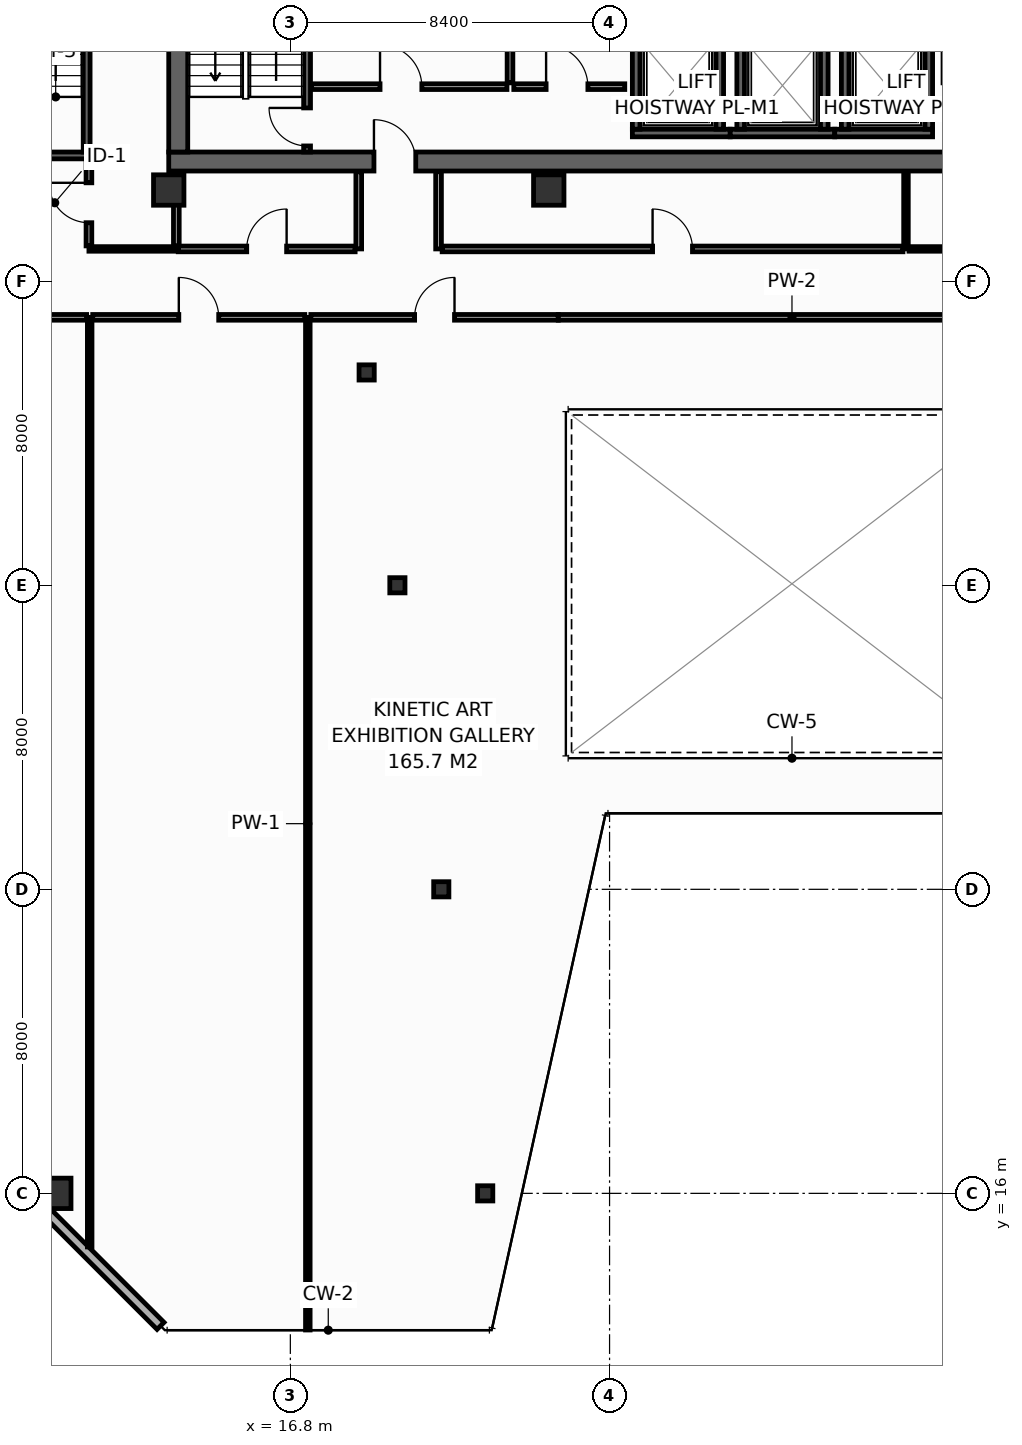
"""IFC4 building model, lengths in metres.
Left out: names, types, materials, properties, quantities, classifications, styles, units other than length and angle.
Written with IfcOpenShell. Run it as: python <this file> out.ifc"""

import sys

from ifc_helpers import new_model, si_unit, direction, frame, frame_2d, origin, origin_2d, place, context, subcontext, project, spatial, rectangle, hollow_rectangle, extrude, element, fill, save


model = new_model("IFC4")
c1 = context("Model", 3, precision=1e-05, world=origin(), true_north=direction((0.0, 1.0)))
c2 = subcontext(c1, "Body", "Model", "MODEL_VIEW")
j1 = project(units=[si_unit("LENGTHUNIT", "METRE"), si_unit("PLANEANGLEUNIT", "RADIAN")], contexts=[c1])
p1 = place(None, origin())
s1 = spatial("IfcSite", under=j1, at=p1, CompositionType="ELEMENT")
p2 = place(p1, origin())
s2 = spatial("IfcBuilding", under=s1, at=p2, CompositionType="ELEMENT")
p3 = place(p2, frame((0.0, 0.0, 209.4)))
s3 = spatial("IfcBuildingStorey", under=s2, at=p3, CompositionType="ELEMENT", Elevation=209.4)
p4 = place(p3, frame((13.6, 43.15, 0.0), z_axis=(0.0, 0.0, 1.0), x_axis=(1.0, 0.0, 0.0)))
e1 = element("IfcWall", 1, at=p4, inside=s3, PredefinedType="SHEAR", context=c2, shape_type="SweptSolid", body=[
    extrude(rectangle(XDim=32.7, YDim=0.5, at=frame_2d((16.35, 0.0))), origin(), (0.0, 0.0, 1.0), 3.55),
])
p5 = place(p4, frame((5.4, 0.0, 0.0)))
e2 = element("IfcOpeningElement", 2, at=p5, cuts=e1, PredefinedType="OPENING", context=c2, shape_type="SweptSolid", body=[
    extrude(rectangle(XDim=1.1, YDim=2.15, at=frame_2d((0.55, 1.075))), frame((0.0, 0.26, 0.0), z_axis=(0.0, -1.0, 0.0), x_axis=(1.0, 0.0, 0.0)), (0.0, 0.0, 1.0), 0.52),
])
p6 = place(p4, frame((25.6, 0.0, 0.0)))
e3 = element("IfcOpeningElement", 3, at=p6, cuts=e1, PredefinedType="OPENING", context=c2, shape_type="SweptSolid", body=[
    extrude(rectangle(XDim=1.1, YDim=2.15, at=frame_2d((0.55, 1.075))), frame((0.0, 0.26, 0.0), z_axis=(0.0, -1.0, 0.0), x_axis=(1.0, 0.0, 0.0)), (0.0, 0.0, 1.0), 0.52),
])
p7 = place(p3, frame((13.85, 43.4, 0.0), z_axis=(0.0, 0.0, 1.0), x_axis=(0.0, 1.0, 0.0)))
e4 = element("IfcWall", 4, at=p7, inside=s3, PredefinedType="SHEAR", context=c2, shape_type="SweptSolid", body=[
    extrude(rectangle(XDim=10.4, YDim=0.5, at=frame_2d((5.2, 0.0))), origin(), (0.0, 0.0, 1.0), 3.55),
])
for number, where, z_axis, x_axis in (
    (5, (13.6, 42.4, 0.0), (0.0, 0.0, 1.0), (1.0, 0.0, 0.0)),
    (6, (23.6, 42.4, 0.0), (0.0, 0.0, 1.0), (1.0, 0.0, 0.0)),
    (7, (10.628, 16.0, 0.0), (0.0, 0.0, 1.0), (1.0, 0.0, 0.0)),
):
    element("IfcColumn", number, at=place(p3, frame(where, z_axis=z_axis, x_axis=x_axis)), inside=s3, PredefinedType="COLUMN", context=c2, shape_type="SweptSolid", body=[
        extrude(hollow_rectangle(XDim=0.8, YDim=0.8, WallThickness=0.036, at=origin_2d()), origin(), (0.0, 0.0, 1.0), 3.8),
    ])
for number, where, z_axis, x_axis in (
    (8, (21.928, 16.0, 0.0), (0.0, 0.0, 1.0), (1.0, 0.0, 0.0)),
    (9, (20.772, 24.0, 0.0), (0.0, 0.0, 1.0), (1.0, 0.0, 0.0)),
    (10, (19.617, 32.0, 0.0), (0.0, 0.0, 1.0), (1.0, 0.0, 0.0)),
    (11, (18.808, 37.6, 0.0), (0.0, 0.0, 1.0), (1.0, 0.0, 0.0)),
):
    element("IfcColumn", number, at=place(p3, frame(where, z_axis=z_axis, x_axis=x_axis)), inside=s3, PredefinedType="COLUMN", context=c2, shape_type="SweptSolid", body=[
        extrude(hollow_rectangle(XDim=0.4, YDim=0.4, WallThickness=0.016, at=origin_2d()), origin(), (0.0, 0.0, 1.0), 3.8),
    ])
p8 = place(p3, frame((25.8, 43.9, 0.0), z_axis=(0.0, 0.0, 1.0), x_axis=(1.0, 0.0, 0.0)))
e12 = element("IfcWall", 12, at=p8, inside=s3, PredefinedType="SHEAR", context=c2, shape_type="SweptSolid", body=[
    extrude(rectangle(XDim=2.575, YDim=0.2, at=frame_2d((1.288, 0.0))), origin(), (0.0, 0.0, 1.0), 3.55),
])
for number, where, z_axis, x_axis in (
    (13, (25.9, 44.0, 0.0), (0.0, 0.0, 1.0), (0.0, 1.0, 0.0)),
    (14, (28.1, 44.0, 0.0), (0.0, 0.0, 1.0), (0.0, 1.0, 0.0)),
):
    element("IfcWall", number, at=place(p3, frame(where, z_axis=z_axis, x_axis=x_axis)), inside=s3, PredefinedType="SHEAR", context=c2, shape_type="SweptSolid", body=[
        extrude(rectangle(XDim=2.3, YDim=0.2, at=frame_2d((1.15, 0.0))), origin(), (0.0, 0.0, 1.0), 3.55),
    ])
p9 = place(p3, frame((28.375, 43.9, 0.0), z_axis=(0.0, 0.0, 1.0), x_axis=(1.0, 0.0, 0.0)))
e15 = element("IfcWall", 15, at=p9, inside=s3, PredefinedType="SHEAR", context=c2, shape_type="SweptSolid", body=[
    extrude(rectangle(XDim=2.75, YDim=0.2, at=frame_2d((1.375, 0.0))), origin(), (0.0, 0.0, 1.0), 3.55),
])
for number, where, z_axis, x_axis in (
    (16, (28.65, 44.0, 0.0), (0.0, 0.0, 1.0), (0.0, 1.0, 0.0)),
    (17, (30.85, 44.0, 0.0), (0.0, 0.0, 1.0), (0.0, 1.0, 0.0)),
):
    element("IfcWall", number, at=place(p3, frame(where, z_axis=z_axis, x_axis=x_axis)), inside=s3, PredefinedType="SHEAR", context=c2, shape_type="SweptSolid", body=[
        extrude(rectangle(XDim=2.3, YDim=0.2, at=frame_2d((1.15, 0.0))), origin(), (0.0, 0.0, 1.0), 3.55),
    ])
p10 = place(p3, frame((31.125, 43.9, 0.0), z_axis=(0.0, 0.0, 1.0), x_axis=(1.0, 0.0, 0.0)))
e18 = element("IfcWall", 18, at=p10, inside=s3, PredefinedType="SHEAR", context=c2, shape_type="SweptSolid", body=[
    extrude(rectangle(XDim=2.575, YDim=0.2, at=frame_2d((1.288, 0.0))), origin(), (0.0, 0.0, 1.0), 3.55),
])
for number, where, z_axis, x_axis in (
    (19, (31.4, 44.0, 0.0), (0.0, 0.0, 1.0), (0.0, 1.0, 0.0)),
    (20, (33.6, 44.0, 0.0), (0.0, 0.0, 1.0), (0.0, 1.0, 0.0)),
):
    element("IfcWall", number, at=place(p3, frame(where, z_axis=z_axis, x_axis=x_axis)), inside=s3, PredefinedType="SHEAR", context=c2, shape_type="SweptSolid", body=[
        extrude(rectangle(XDim=2.3, YDim=0.2, at=frame_2d((1.15, 0.0))), origin(), (0.0, 0.0, 1.0), 3.55),
    ])
p11 = place(p3, frame((17.24, 43.4, 0.0), z_axis=(0.0, 0.0, 1.0), x_axis=(0.0, 1.0, 0.0)))
e21 = element("IfcWall", 21, at=p11, inside=s3, PredefinedType="SHEAR", context=c2, shape_type="SweptSolid", body=[
    extrude(rectangle(XDim=10.4, YDim=0.18, at=frame_2d((5.2, 0.0))), origin(), (0.0, 0.0, 1.0), 3.55),
])
p12 = place(p11, frame((0.16, 0.0, 0.0)))
e22 = element("IfcOpeningElement", 22, at=p12, cuts=e21, PredefinedType="OPENING", context=c2, shape_type="SweptSolid", body=[
    extrude(rectangle(XDim=1.0, YDim=2.15, at=frame_2d((0.5, 1.075))), frame((0.0, 0.1, 0.0), z_axis=(0.0, -1.0, 0.0), x_axis=(1.0, 0.0, 0.0)), (0.0, 0.0, 1.0), 0.2),
])
p13 = place(p3, frame((8.12, 43.31, 0.0), z_axis=(0.0, 0.0, 1.0), x_axis=(1.0, 0.0, 0.0)))
e23 = element("IfcWall", 23, at=p13, inside=s3, PredefinedType="SHEAR", context=c2, shape_type="SweptSolid", body=[
    extrude(rectangle(XDim=3.41, YDim=0.18, at=frame_2d((1.705, 0.0))), origin(), (0.0, 0.0, 1.0), 3.55),
])
p14 = place(p13, frame((1.15, 0.0, 0.0)))
e24 = element("IfcOpeningElement", 24, at=p14, cuts=e23, PredefinedType="OPENING", context=c2, shape_type="SweptSolid", body=[
    extrude(rectangle(XDim=1.1, YDim=2.15, at=frame_2d((0.55, 1.075))), frame((0.0, 0.1, 0.0), z_axis=(0.0, -1.0, 0.0), x_axis=(1.0, 0.0, 0.0)), (0.0, 0.0, 1.0), 0.2),
])
p15 = place(p3, frame((11.44, 43.4, 0.0), z_axis=(0.0, 0.0, 1.0), x_axis=(0.0, 1.0, 0.0)))
e25 = element("IfcWall", 25, at=p15, inside=s3, PredefinedType="SHEAR", context=c2, shape_type="SweptSolid", body=[
    extrude(rectangle(XDim=10.4, YDim=0.18, at=frame_2d((5.2, 0.0))), origin(), (0.0, 0.0, 1.0), 3.55),
])
p16 = place(p3, frame((17.36, 45.12, 0.0), z_axis=(0.0, 0.0, 1.0), x_axis=(1.0, 0.0, 0.0)))
e26 = element("IfcWall", 26, at=p16, inside=s3, PredefinedType="PARTITIONING", context=c2, shape_type="SweptSolid", body=[
    extrude(rectangle(XDim=5.14, YDim=0.15, at=frame_2d((2.57, 0.0))), origin(), (0.0, 0.0, 1.0), 3.55),
])
p17 = place(p16, frame((1.8, 0.0, 0.0)))
e27 = element("IfcOpeningElement", 27, at=p17, cuts=e26, PredefinedType="OPENING", context=c2, shape_type="SweptSolid", body=[
    extrude(rectangle(XDim=1.1, YDim=2.15, at=frame_2d((0.55, 1.075))), frame((0.0, 0.085, 0.0), z_axis=(0.0, -1.0, 0.0), x_axis=(1.0, 0.0, 0.0)), (0.0, 0.0, 1.0), 0.17),
])
p18 = place(p3, frame((22.58, 50.55, 0.0), z_axis=(0.0, 0.0, 1.0), x_axis=(0.0, -1.0, 0.0)))
e28 = element("IfcWall", 28, at=p18, inside=s3, PredefinedType="PARTITIONING", context=c2, shape_type="SweptSolid", body=[
    extrude(rectangle(XDim=5.33, YDim=0.15, at=frame_2d((2.665, 0.0))), origin(), (0.0, 0.0, 1.0), 3.55),
])
p19 = place(p18, frame((1.8, 0.0, 0.0)))
e29 = element("IfcOpeningElement", 29, at=p19, cuts=e28, PredefinedType="OPENING", context=c2, shape_type="SweptSolid", body=[
    extrude(rectangle(XDim=1.1, YDim=2.15, at=frame_2d((0.55, 1.075))), frame((0.0, 0.085, 0.0), z_axis=(0.0, -1.0, 0.0), x_axis=(1.0, 0.0, 0.0)), (0.0, 0.0, 1.0), 0.17),
])
p20 = place(p3, frame((22.68, 45.12, 0.0), z_axis=(0.0, 0.0, 1.0), x_axis=(1.0, 0.0, 0.0)))
e30 = element("IfcWall", 30, at=p20, inside=s3, PredefinedType="PARTITIONING", context=c2, shape_type="SweptSolid", body=[
    extrude(rectangle(XDim=2.92, YDim=0.15, at=frame_2d((1.46, 0.0))), origin(), (0.0, 0.0, 1.0), 3.55),
])
p21 = place(p20, frame((0.85, 0.0, 0.0)))
e31 = element("IfcOpeningElement", 31, at=p21, cuts=e30, PredefinedType="OPENING", context=c2, shape_type="SweptSolid", body=[
    extrude(rectangle(XDim=1.1, YDim=2.15, at=frame_2d((0.55, 1.075))), frame((0.0, 0.085, 0.0), z_axis=(0.0, -1.0, 0.0), x_axis=(1.0, 0.0, 0.0)), (0.0, 0.0, 1.0), 0.17),
])
p22 = place(p3, frame((10.411, 15.487, 0.0), z_axis=(0.0, 0.0, 1.0), x_axis=(0.707135806771, -0.70707775441, 0.0)))
e32 = element("IfcWall", 32, at=p22, inside=s3, PredefinedType="STANDARD", context=c2, shape_type="SweptSolid", body=[
    extrude(rectangle(XDim=4.206, YDim=0.26, at=frame_2d((2.103, 0.0))), origin(), (0.0, 0.0, 1.0), 3.55),
])
p23 = place(p3, frame((11.5, 40.85, 0.0), z_axis=(0.0, 0.0, 1.0), x_axis=(1.0, 0.0, 0.0)))
e33 = element("IfcWall", 33, at=p23, inside=s3, PredefinedType="PARTITIONING", context=c2, shape_type="SweptSolid", body=[
    extrude(rectangle(XDim=2.35, YDim=0.12, at=frame_2d((1.175, 0.0))), origin(), (0.0, 0.0, 1.0), 3.55),
])
p24 = place(p3, frame((11.5, 40.93, 0.0), z_axis=(0.0, 0.0, 1.0), x_axis=(0.0, 1.0, 0.0)))
e34 = element("IfcWall", 34, at=p24, inside=s3, PredefinedType="PARTITIONING", context=c2, shape_type="SweptSolid", body=[
    extrude(rectangle(XDim=2.27, YDim=0.15, at=frame_2d((1.135, 0.0))), origin(), (0.0, 0.0, 1.0), 2.835),
])
p25 = place(p24, frame((0.61, 0.0, 0.0)))
e35 = element("IfcOpeningElement", 35, at=p25, cuts=e34, PredefinedType="OPENING", context=c2, shape_type="SweptSolid", body=[
    extrude(rectangle(XDim=1.05, YDim=2.15, at=frame_2d((0.525, 1.075))), frame((0.0, 0.085, 0.0), z_axis=(0.0, -1.0, 0.0), x_axis=(1.0, 0.0, 0.0)), (0.0, 0.0, 1.0), 0.17),
])
p26 = place(p3, frame((13.8, 40.93, 0.0), z_axis=(0.0, 0.0, 1.0), x_axis=(0.0, 1.0, 0.0)))
e36 = element("IfcWall", 36, at=p26, inside=s3, PredefinedType="PARTITIONING", context=c2, shape_type="SweptSolid", body=[
    extrude(rectangle(XDim=1.95, YDim=0.15, at=frame_2d((0.975, 0.0))), origin(), (0.0, 0.0, 1.0), 3.55),
])
for number, where, z_axis, x_axis in (
    (37, (18.6, 40.85, 0.0), (0.0, 0.0, 1.0), (0.0, 1.0, 0.0)),
    (38, (20.7, 40.85, 0.0), (0.0, 0.0, 1.0), (0.0, 1.0, 0.0)),
):
    element("IfcWall", number, at=place(p3, frame(where, z_axis=z_axis, x_axis=x_axis)), inside=s3, PredefinedType="PARTITIONING", context=c2, shape_type="SweptSolid", body=[
        extrude(rectangle(XDim=2.03, YDim=0.15, at=frame_2d((1.015, 0.0))), origin(), (0.0, 0.0, 1.0), 3.55),
    ])
p27 = place(p3, frame((13.85, 40.85, 0.0), z_axis=(0.0, 0.0, 1.0), x_axis=(1.0, 0.0, 0.0)))
e39 = element("IfcWall", 39, at=p27, inside=s3, PredefinedType="PARTITIONING", context=c2, shape_type="SweptSolid", body=[
    extrude(rectangle(XDim=4.655, YDim=0.15, at=frame_2d((2.327, 0.0))), origin(), (0.0, 0.0, 1.0), 3.55),
])
p28 = place(p27, frame((1.802, 0.0, 0.0)))
e40 = element("IfcOpeningElement", 40, at=p28, cuts=e39, PredefinedType="OPENING", context=c2, shape_type="SweptSolid", body=[
    extrude(rectangle(XDim=1.05, YDim=2.15, at=frame_2d((0.525, 1.075))), frame((0.0, 0.085, 0.0), z_axis=(0.0, -1.0, 0.0), x_axis=(1.0, 0.0, 0.0)), (0.0, 0.0, 1.0), 0.17),
])
p29 = place(p3, frame((33.0, 40.85, 0.0), z_axis=(0.0, 0.0, 1.0), x_axis=(0.0, 1.0, 0.0)))
e41 = element("IfcWall", 41, at=p29, inside=s3, PredefinedType="PARTITIONING", context=c2, shape_type="SweptSolid", body=[
    extrude(rectangle(XDim=2.03, YDim=0.12, at=frame_2d((1.015, 0.0))), origin(), (0.0, 0.0, 1.0), 2.835),
])
p30 = place(p3, frame((20.795, 40.85, 0.0), z_axis=(0.0, 0.0, 1.0), x_axis=(1.0, 0.0, 0.0)))
e42 = element("IfcWall", 42, at=p30, inside=s3, PredefinedType="PARTITIONING", context=c2, shape_type="SweptSolid", body=[
    extrude(rectangle(XDim=12.125, YDim=0.15, at=frame_2d((6.062, 0.0))), origin(), (0.0, 0.0, 1.0), 2.835),
])
p31 = place(p30, frame((5.537, 0.0, 0.0)))
e43 = element("IfcOpeningElement", 43, at=p31, cuts=e42, PredefinedType="OPENING", context=c2, shape_type="SweptSolid", body=[
    extrude(rectangle(XDim=1.05, YDim=2.15, at=frame_2d((0.525, 1.075))), frame((0.0, 0.085, 0.0), z_axis=(0.0, -1.0, 0.0), x_axis=(1.0, 0.0, 0.0)), (0.0, 0.0, 1.0), 0.17),
])
p32 = place(p3, frame((33.08, 40.85, 0.0), z_axis=(0.0, 0.0, 1.0), x_axis=(1.0, 0.0, 0.0)))
e44 = element("IfcWall", 44, at=p32, inside=s3, PredefinedType="PARTITIONING", context=c2, shape_type="SweptSolid", body=[
    extrude(rectangle(XDim=5.625, YDim=0.12, at=frame_2d((2.812, 0.0))), origin(), (0.0, 0.0, 1.0), 2.835),
])
p33 = place(p32, frame((1.702, 0.0, 0.0)))
e45 = element("IfcOpeningElement", 45, at=p33, cuts=e44, PredefinedType="OPENING", context=c2, shape_type="SweptSolid", body=[
    extrude(rectangle(XDim=0.9, YDim=2.1, at=frame_2d((0.45, 1.05))), frame((0.0, 0.07, 0.0), z_axis=(0.0, -1.0, 0.0), x_axis=(1.0, 0.0, 0.0)), (0.0, 0.0, 1.0), 0.14),
])
p34 = place(p3, frame((11.52, 14.59, 0.0), z_axis=(0.0, 0.0, 1.0), x_axis=(0.0, 1.0, 0.0)))
e46 = element("IfcWall", 46, at=p34, inside=s3, PredefinedType="PARTITIONING", context=c2, shape_type="SweptSolid", body=[
    extrude(rectangle(XDim=24.46, YDim=0.12, at=frame_2d((12.23, 0.0))), origin(), (0.0, 0.0, 1.0), 2.835),
])
p35 = place(p3, frame((17.26, 12.405, 0.0), z_axis=(0.0, 0.0, 1.0), x_axis=(0.0, 1.0, 0.0)))
e47 = element("IfcWall", 47, at=p35, inside=s3, PredefinedType="PARTITIONING", context=c2, shape_type="SweptSolid", body=[
    extrude(rectangle(XDim=26.645, YDim=0.12, at=frame_2d((13.323, 0.0))), origin(), (0.0, 0.0, 1.0), 2.835),
])
p36 = place(p3, frame((6.348, 39.05, 0.0), z_axis=(0.0, 0.0, 1.0), x_axis=(1.0, 0.0, 0.0)))
e48 = element("IfcWall", 48, at=p36, inside=s3, PredefinedType="PARTITIONING", context=c2, shape_type="SweptSolid", body=[
    extrude(rectangle(XDim=5.092, YDim=0.15, at=frame_2d((2.546, 0.0))), origin(), (0.0, 0.0, 1.0), 3.035),
])
p37 = place(p36, frame((2.021, 0.0, 0.0)))
e49 = element("IfcOpeningElement", 49, at=p37, cuts=e48, PredefinedType="OPENING", context=c2, shape_type="SweptSolid", body=[
    extrude(rectangle(XDim=1.05, YDim=2.15, at=frame_2d((0.525, 1.075))), frame((0.0, 0.085, 0.0), z_axis=(0.0, -1.0, 0.0), x_axis=(1.0, 0.0, 0.0)), (0.0, 0.0, 1.0), 0.17),
])
p38 = place(p3, frame((11.6, 39.05, 0.0), z_axis=(0.0, 0.0, 1.0), x_axis=(1.0, 0.0, 0.0)))
e50 = element("IfcWall", 50, at=p38, inside=s3, PredefinedType="PARTITIONING", context=c2, shape_type="SweptSolid", body=[
    extrude(rectangle(XDim=5.58, YDim=0.15, at=frame_2d((2.79, 0.0))), origin(), (0.0, 0.0, 1.0), 3.55),
])
p39 = place(p38, frame((2.265, 0.0, 0.0)))
e51 = element("IfcOpeningElement", 51, at=p39, cuts=e50, PredefinedType="OPENING", context=c2, shape_type="SweptSolid", body=[
    extrude(rectangle(XDim=1.05, YDim=2.15, at=frame_2d((0.525, 1.075))), frame((0.0, 0.085, 0.0), z_axis=(0.0, -1.0, 0.0), x_axis=(1.0, 0.0, 0.0)), (0.0, 0.0, 1.0), 0.17),
])
p40 = place(p3, frame((17.34, 39.05, 0.0), z_axis=(0.0, 0.0, 1.0), x_axis=(1.0, 0.0, 0.0)))
e52 = element("IfcWall", 52, at=p40, inside=s3, PredefinedType="PARTITIONING", context=c2, shape_type="SweptSolid", body=[
    extrude(rectangle(XDim=6.51, YDim=0.15, at=frame_2d((3.255, 0.0))), origin(), (0.0, 0.0, 1.0), 2.835),
])
p41 = place(p40, frame((2.73, 0.0, 0.0)))
e53 = element("IfcOpeningElement", 53, at=p41, cuts=e52, PredefinedType="OPENING", context=c2, shape_type="SweptSolid", body=[
    extrude(rectangle(XDim=1.05, YDim=2.15, at=frame_2d((0.525, 1.075))), frame((0.0, 0.085, 0.0), z_axis=(0.0, -1.0, 0.0), x_axis=(1.0, 0.0, 0.0)), (0.0, 0.0, 1.0), 0.17),
])
p42 = place(p3, frame((23.85, 39.05, 0.0), z_axis=(0.0, 0.0, 1.0), x_axis=(1.0, 0.0, 0.0)))
e54 = element("IfcWall", 54, at=p42, inside=s3, PredefinedType="PARTITIONING", context=c2, shape_type="SweptSolid", body=[
    extrude(rectangle(XDim=12.3, YDim=0.15, at=frame_2d((6.15, 0.0))), origin(), (0.0, 0.0, 1.0), 3.55),
])
p43 = place(p12, origin())
e55 = element("IfcDoor", 55, at=p43, inside=s3, OperationType="SINGLE_SWING_RIGHT", PredefinedType="DOOR", context=c2, shape_type="SweptSolid", body=[
    extrude(rectangle(XDim=1.0, YDim=2.15, at=frame_2d((0.5, 1.075))), frame((0.0, 0.025, 0.0), z_axis=(0.0, -1.0, 0.0), x_axis=(1.0, 0.0, 0.0)), (0.0, 0.0, 1.0), 0.05),
])
fill(e22, e55)
p44 = place(p17, origin())
e56 = element("IfcDoor", 56, at=p44, inside=s3, OperationType="SINGLE_SWING_LEFT", PredefinedType="DOOR", context=c2, shape_type="SweptSolid", body=[
    extrude(rectangle(XDim=1.1, YDim=2.15, at=frame_2d((0.55, 1.075))), frame((0.0, 0.025, 0.0), z_axis=(0.0, -1.0, 0.0), x_axis=(1.0, 0.0, 0.0)), (0.0, 0.0, 1.0), 0.05),
])
fill(e27, e56)
p45 = place(p21, origin())
e57 = element("IfcDoor", 57, at=p45, inside=s3, OperationType="SINGLE_SWING_LEFT", PredefinedType="DOOR", context=c2, shape_type="SweptSolid", body=[
    extrude(rectangle(XDim=1.1, YDim=2.15, at=frame_2d((0.55, 1.075))), frame((0.0, 0.025, 0.0), z_axis=(0.0, -1.0, 0.0), x_axis=(1.0, 0.0, 0.0)), (0.0, 0.0, 1.0), 0.05),
])
fill(e31, e57)
p46 = place(p5, origin())
e58 = element("IfcDoor", 58, at=p46, inside=s3, OperationType="SINGLE_SWING_LEFT", PredefinedType="DOOR", context=c2, shape_type="SweptSolid", body=[
    extrude(rectangle(XDim=1.1, YDim=2.15, at=frame_2d((0.55, 1.075))), frame((0.0, 0.025, 0.0), z_axis=(0.0, -1.0, 0.0), x_axis=(1.0, 0.0, 0.0)), (0.0, 0.0, 1.0), 0.05),
])
fill(e2, e58)
p47 = place(p25, origin())
e59 = element("IfcDoor", 59, at=p47, inside=s3, OperationType="SINGLE_SWING_RIGHT", PredefinedType="DOOR", context=c2, shape_type="SweptSolid", body=[
    extrude(rectangle(XDim=1.05, YDim=2.15, at=frame_2d((0.525, 1.075))), frame((0.0, 0.025, 0.0), z_axis=(0.0, -1.0, 0.0), x_axis=(1.0, 0.0, 0.0)), (0.0, 0.0, 1.0), 0.05),
])
fill(e35, e59)
p48 = place(p28, origin())
e60 = element("IfcDoor", 60, at=p48, inside=s3, OperationType="SINGLE_SWING_RIGHT", PredefinedType="DOOR", context=c2, shape_type="SweptSolid", body=[
    extrude(rectangle(XDim=1.05, YDim=2.15, at=frame_2d((0.525, 1.075))), frame((0.0, 0.025, 0.0), z_axis=(0.0, -1.0, 0.0), x_axis=(1.0, 0.0, 0.0)), (0.0, 0.0, 1.0), 0.05),
])
fill(e40, e60)
p49 = place(p31, origin())
e61 = element("IfcDoor", 61, at=p49, inside=s3, OperationType="SINGLE_SWING_LEFT", PredefinedType="DOOR", context=c2, shape_type="SweptSolid", body=[
    extrude(rectangle(XDim=1.05, YDim=2.15, at=frame_2d((0.525, 1.075))), frame((0.0, 0.025, 0.0), z_axis=(0.0, -1.0, 0.0), x_axis=(1.0, 0.0, 0.0)), (0.0, 0.0, 1.0), 0.05),
])
fill(e43, e61)
p50 = place(p39, origin())
e62 = element("IfcDoor", 62, at=p50, inside=s3, OperationType="SINGLE_SWING_LEFT", PredefinedType="DOOR", context=c2, shape_type="SweptSolid", body=[
    extrude(rectangle(XDim=1.05, YDim=2.15, at=frame_2d((0.525, 1.075))), frame((0.0, 0.025, 0.0), z_axis=(0.0, -1.0, 0.0), x_axis=(1.0, 0.0, 0.0)), (0.0, 0.0, 1.0), 0.05),
])
fill(e51, e62)
p51 = place(p41, origin())
e63 = element("IfcDoor", 63, at=p51, inside=s3, OperationType="SINGLE_SWING_RIGHT", PredefinedType="DOOR", context=c2, shape_type="SweptSolid", body=[
    extrude(rectangle(XDim=1.05, YDim=2.15, at=frame_2d((0.525, 1.075))), frame((0.0, 0.025, 0.0), z_axis=(0.0, -1.0, 0.0), x_axis=(1.0, 0.0, 0.0)), (0.0, 0.0, 1.0), 0.05),
])
fill(e53, e63)
save(model, sys.argv[1])
